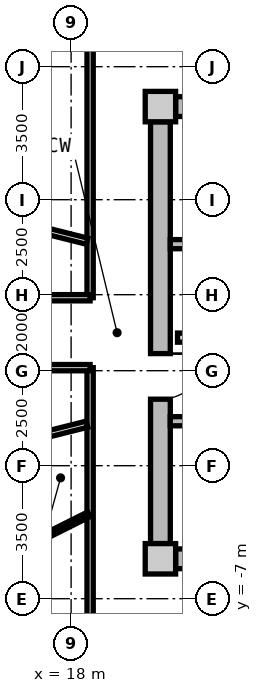
"""IFC4 building model, lengths in metres.
Left out: names, types, materials, properties, quantities, classifications, styles, units other than length and angle.
Written with IfcOpenShell. Run it as: python <this file> out.ifc"""

import sys

from ifc_helpers import new_model, si_unit, direction, frame, frame_2d, origin, origin_2d, place, context, subcontext, project, spatial, rectangle, extrude, source, transform, mapped, element, fill, save


model = new_model("IFC4")
c1 = context("Model", 3, precision=1e-05, world=origin(), true_north=direction((0.0, 1.0)))
c2 = subcontext(c1, "Body", "Model", "MODEL_VIEW")
j1 = project(units=[si_unit("LENGTHUNIT", "METRE"), si_unit("PLANEANGLEUNIT", "RADIAN")], contexts=[c1])
p1 = place(None, origin())
s1 = spatial("IfcSite", under=j1, at=p1, CompositionType="ELEMENT")
p2 = place(p1, origin())
s2 = spatial("IfcBuilding", under=s1, at=p2, CompositionType="ELEMENT")
p3 = place(p2, frame((0.0, 0.0, 229.15)))
s3 = spatial("IfcBuildingStorey", under=s2, at=p3, CompositionType="ELEMENT", Elevation=229.15)
m1 = source(origin(), c2, "Body", "SweptSolid", [
    extrude(rectangle(XDim=0.8, YDim=0.8, at=origin_2d()), origin(), (0.0, 0.0, 1.0), 3.05),
])
for number, where, z_axis, x_axis in (
    (1, (20.35, -5.95, 0.0), (0.0, 0.0, 1.0), (1.0, 0.0, 0.0)),
    (2, (20.35, 5.95, 0.0), (0.0, 0.0, 1.0), (1.0, 0.0, 0.0)),
):
    element("IfcColumn", number, at=place(p3, frame(where, z_axis=z_axis, x_axis=x_axis)), inside=s3, PredefinedType="COLUMN", context=c2, shape_type="MappedRepresentation", body=[
        mapped(m1, transform((0.0, 0.0, 0.0), x_axis=(1.0, 0.0, 0.0), y_axis=(0.0, 1.0, 0.0), z_axis=(0.0, 0.0, 1.0), scale=1.0)),
    ])
m2 = source(origin(), c2, "Body", "SweptSolid", [
    extrude(rectangle(XDim=14.5, YDim=0.52, at=frame_2d((7.25, 0.0))), origin(), (0.0, 0.0, 1.0), 2.81),
])
for number, where, z_axis, x_axis in (
    (3, (20.75, 5.95, 0.0), (0.0, 0.0, 1.0), (1.0, 0.0, 0.0)),
    (4, (35.25, -5.95, 0.0), (0.0, 0.0, 1.0), (-1.0, 0.0, 0.0)),
):
    element("IfcWall", number, at=place(p3, frame(where, z_axis=z_axis, x_axis=x_axis)), inside=s3, PredefinedType="SHEAR", context=c2, shape_type="MappedRepresentation", body=[
        mapped(m2, transform((0.0, 0.0, 0.0), x_axis=(1.0, 0.0, 0.0), y_axis=(0.0, 1.0, 0.0), z_axis=(0.0, 0.0, 1.0), scale=1.0)),
    ])
m3 = source(origin(), c2, "Body", "SweptSolid", [
    extrude(rectangle(XDim=11.1, YDim=0.52, at=frame_2d((5.55, 0.0))), origin(), (0.0, 0.0, 1.0), 2.81),
])
p4 = place(p3, frame((20.35, -5.55, 0.0), z_axis=(0.0, 0.0, 1.0), x_axis=(0.0, 1.0, 0.0)))
e5 = element("IfcWall", 5, at=p4, inside=s3, PredefinedType="SHEAR", context=c2, shape_type="MappedRepresentation", body=[
    mapped(m3, transform((0.0, 0.0, 0.0), x_axis=(1.0, 0.0, 0.0), y_axis=(0.0, 1.0, 0.0), z_axis=(0.0, 0.0, 1.0), scale=1.0)),
])
p5 = place(p4, frame((3.8, 0.0, 0.0)))
e6 = element("IfcOpeningElement", 6, at=p5, cuts=e5, PredefinedType="OPENING", context=c2, shape_type="SweptSolid", body=[
    extrude(rectangle(XDim=1.2, YDim=2.15, at=frame_2d((0.6, 1.075))), frame((0.0, 0.27, 0.0), z_axis=(0.0, -1.0, 0.0), x_axis=(1.0, 0.0, 0.0)), (0.0, 0.0, 1.0), 0.54),
])
m4 = source(origin(), c2, "Body", "SweptSolid", [
    extrude(rectangle(XDim=7.93, YDim=0.24, at=frame_2d((3.965, 0.0))), origin(), (0.0, 0.0, 1.0), 2.81),
])
p6 = place(p3, frame((20.61, 2.33, 0.0), z_axis=(0.0, 0.0, 1.0), x_axis=(1.0, 0.0, 0.0)))
e7 = element("IfcWall", 7, at=p6, inside=s3, PredefinedType="PARTITIONING", context=c2, shape_type="MappedRepresentation", body=[
    mapped(m4, transform((0.0, 0.0, 0.0), x_axis=(1.0, 0.0, 0.0), y_axis=(0.0, 1.0, 0.0), z_axis=(0.0, 0.0, 1.0), scale=1.0)),
])
p7 = place(p3, frame((20.61, -2.33, 0.0), z_axis=(0.0, 0.0, 1.0), x_axis=(1.0, 0.0, 0.0)))
e8 = element("IfcWall", 8, at=p7, inside=s3, PredefinedType="PARTITIONING", context=c2, shape_type="MappedRepresentation", body=[
    mapped(m4, transform((0.0, 0.0, 0.0), x_axis=(1.0, 0.0, 0.0), y_axis=(0.0, 1.0, 0.0), z_axis=(0.0, 0.0, 1.0), scale=1.0)),
])
p8 = place(p7, frame((1.05, 0.0, 0.0)))
e9 = element("IfcOpeningElement", 9, at=p8, cuts=e8, PredefinedType="OPENING", context=c2, shape_type="SweptSolid", body=[
    extrude(rectangle(XDim=1.1, YDim=2.15, at=frame_2d((0.55, 1.075))), frame((0.0, 0.13, 0.0), z_axis=(0.0, -1.0, 0.0), x_axis=(1.0, 0.0, 0.0)), (0.0, 0.0, 1.0), 0.26),
])
m5 = source(origin(), c2, "Body", "SweptSolid", [
    extrude(rectangle(XDim=7.62, YDim=0.24, at=frame_2d((3.81, 0.0))), origin(), (0.0, 0.0, 1.0), 2.795),
])
p9 = place(p3, frame((20.8, -0.13, 0.0), z_axis=(0.0, 0.0, 1.0), x_axis=(1.0, 0.0, 0.0)))
e10 = element("IfcWall", 10, at=p9, inside=s3, PredefinedType="PARTITIONING", context=c2, shape_type="MappedRepresentation", body=[
    mapped(m5, transform((0.0, 0.0, 0.0), x_axis=(1.0, 0.0, 0.0), y_axis=(0.0, 1.0, 0.0), z_axis=(0.0, 0.0, 1.0), scale=1.0)),
])
p10 = place(p9, frame((6.22, 0.0, 0.0)))
e11 = element("IfcOpeningElement", 11, at=p10, cuts=e10, PredefinedType="OPENING", context=c2, shape_type="SweptSolid", body=[
    extrude(rectangle(XDim=1.0, YDim=2.1, at=frame_2d((0.5, 1.05))), frame((0.0, 0.13, 0.0), z_axis=(0.0, -1.0, 0.0), x_axis=(1.0, 0.0, 0.0)), (0.0, 0.0, 1.0), 0.26),
])
p11 = place(p9, frame((2.4, 0.0, 0.0)))
e12 = element("IfcOpeningElement", 12, at=p11, cuts=e10, PredefinedType="OPENING", context=c2, shape_type="SweptSolid", body=[
    extrude(rectangle(XDim=1.0, YDim=2.1, at=frame_2d((0.5, 1.05))), frame((0.0, 0.13, 0.0), z_axis=(0.0, -1.0, 0.0), x_axis=(1.0, 0.0, 0.0)), (0.0, 0.0, 1.0), 0.26),
])
m6 = source(origin(), c2, "Body", "SweptSolid", [
    extrude(rectangle(XDim=6.88, YDim=0.165, at=frame_2d((3.44, 0.0))), origin(), (0.0, 0.0, 1.0), 2.795),
])
for number, where, z_axis, x_axis in (
    (13, (18.5, -7.8, 0.0), (0.0, 0.0, 1.0), (0.0, 1.0, 0.0)),
    (14, (18.5, 0.92, 0.0), (0.0, 0.0, 1.0), (0.0, 1.0, 0.0)),
):
    element("IfcWall", number, at=place(p3, frame(where, z_axis=z_axis, x_axis=x_axis)), inside=s3, PredefinedType="PARTITIONING", context=c2, shape_type="MappedRepresentation", body=[
        mapped(m6, transform((0.0, 0.0, 0.0), x_axis=(1.0, 0.0, 0.0), y_axis=(0.0, 1.0, 0.0), z_axis=(0.0, 0.0, 1.0), scale=1.0)),
    ])
m7 = source(origin(), c2, "Body", "SweptSolid", [
    extrude(rectangle(XDim=6.157, YDim=0.165, at=frame_2d((3.079, 0.0))), origin(), (0.0, 0.0, 1.0), 2.395),
])
for number, where, z_axis, x_axis in (
    (15, (18.42, 2.407, 0.0), (0.0, 0.0, 1.0), (-0.97, 0.244, 0.0)),
    (16, (18.42, -2.407, 0.0), (0.0, 0.0, 1.0), (-0.97, -0.244, 0.0)),
):
    element("IfcWall", number, at=place(p3, frame(where, z_axis=z_axis, x_axis=x_axis)), inside=s3, PredefinedType="PARTITIONING", context=c2, shape_type="MappedRepresentation", body=[
        mapped(m7, transform((0.0, 0.0, 0.0), x_axis=(1.0, 0.0, 0.0), y_axis=(0.0, 1.0, 0.0), z_axis=(0.0, 0.0, 1.0), scale=1.0)),
    ])
m8 = source(origin(), c2, "Body", "SweptSolid", [
    extrude(rectangle(XDim=1.638, YDim=0.14, at=frame_2d((0.819, 0.0))), origin(), (0.0, 0.0, 1.0), 2.795),
])
p12 = place(p3, frame((18.47, -4.778, 0.0), z_axis=(0.0, 0.0, 1.0), x_axis=(-0.893919977945, -0.448226586707, 0.0)))
e17 = element("IfcWall", 17, at=p12, inside=s3, PredefinedType="PARTITIONING", context=c2, shape_type="MappedRepresentation", body=[
    mapped(m8, transform((0.0, 0.0, 0.0), x_axis=(1.0, 0.0, 0.0), y_axis=(0.0, 1.0, 0.0), z_axis=(0.0, 0.0, 1.0), scale=1.0)),
])
m9 = source(origin(), c2, "Body", "SweptSolid", [
    extrude(rectangle(XDim=3.45, YDim=0.115, at=frame_2d((1.725, 0.0))), origin(), (0.0, 0.0, 1.0), 2.795),
])
p13 = place(p3, frame((16.475, -6.275, 0.0), z_axis=(0.0, 0.0, 1.0), x_axis=(0.483659007882, -0.875256513312, 0.0)))
e18 = element("IfcWall", 18, at=p13, inside=s3, PredefinedType="PARTITIONING", context=c2, shape_type="MappedRepresentation", body=[
    mapped(m9, transform((0.0, 0.0, 0.0), x_axis=(1.0, 0.0, 0.0), y_axis=(0.0, 1.0, 0.0), z_axis=(0.0, 0.0, 1.0), scale=1.0)),
])
p14 = place(p13, frame((1.25, 0.0, 0.0)))
e19 = element("IfcOpeningElement", 19, at=p14, cuts=e18, PredefinedType="OPENING", context=c2, shape_type="SweptSolid", body=[
    extrude(rectangle(XDim=0.95, YDim=2.1, at=frame_2d((0.475, 1.05))), frame((0.0, 0.067, 0.0), z_axis=(0.0, -1.0, 0.0), x_axis=(1.0, 0.0, 0.0)), (0.0, 0.0, 1.0), 0.135),
])
m10 = source(origin(), c2, "Body", "SweptSolid", [
    extrude(rectangle(XDim=37.0, YDim=0.165, at=frame_2d((18.5, 0.0))), origin(), (0.0, 0.0, 1.0), 2.795),
])
p15 = place(p3, frame((-18.5, -0.92, 0.0), z_axis=(0.0, 0.0, 1.0), x_axis=(1.0, 0.0, 0.0)))
e20 = element("IfcWall", 20, at=p15, inside=s3, PredefinedType="PARTITIONING", context=c2, shape_type="MappedRepresentation", body=[
    mapped(m10, transform((0.0, 0.0, 0.0), x_axis=(1.0, 0.0, 0.0), y_axis=(0.0, 1.0, 0.0), z_axis=(0.0, 0.0, 1.0), scale=1.0)),
])
p16 = place(p15, frame((2.662, 0.0, 0.0)))
e21 = element("IfcOpeningElement", 21, at=p16, cuts=e20, PredefinedType="OPENING", context=c2, shape_type="SweptSolid", body=[
    extrude(rectangle(XDim=0.95, YDim=2.1, at=frame_2d((0.475, 1.05))), frame((0.0, 0.093, 0.0), z_axis=(0.0, -1.0, 0.0), x_axis=(1.0, 0.0, 0.0)), (0.0, 0.0, 1.0), 0.185),
])
p17 = place(p15, frame((33.388, 0.0, 0.0)))
e22 = element("IfcOpeningElement", 22, at=p17, cuts=e20, PredefinedType="OPENING", context=c2, shape_type="SweptSolid", body=[
    extrude(rectangle(XDim=0.95, YDim=2.1, at=frame_2d((0.475, 1.05))), frame((0.0, 0.093, 0.0), z_axis=(0.0, -1.0, 0.0), x_axis=(1.0, 0.0, 0.0)), (0.0, 0.0, 1.0), 0.185),
])
p18 = place(p15, frame((12.71, 0.0, 0.0)))
e23 = element("IfcOpeningElement", 23, at=p18, cuts=e20, PredefinedType="OPENING", context=c2, shape_type="SweptSolid", body=[
    extrude(rectangle(XDim=1.25, YDim=2.2, at=frame_2d((0.625, 1.1))), frame((0.0, 0.093, 0.0), z_axis=(0.0, -1.0, 0.0), x_axis=(1.0, 0.0, 0.0)), (0.0, 0.0, 1.0), 0.185),
])
p19 = place(p15, frame((20.875, 0.0, 0.0)))
e24 = element("IfcOpeningElement", 24, at=p19, cuts=e20, PredefinedType="OPENING", context=c2, shape_type="SweptSolid", body=[
    extrude(rectangle(XDim=1.25, YDim=2.2, at=frame_2d((0.625, 1.1))), frame((0.0, 0.093, 0.0), z_axis=(0.0, -1.0, 0.0), x_axis=(1.0, 0.0, 0.0)), (0.0, 0.0, 1.0), 0.185),
])
p20 = place(p15, frame((26.675, 0.0, 0.0)))
e25 = element("IfcOpeningElement", 25, at=p20, cuts=e20, PredefinedType="OPENING", context=c2, shape_type="SweptSolid", body=[
    extrude(rectangle(XDim=1.25, YDim=2.2, at=frame_2d((0.625, 1.1))), frame((0.0, 0.093, 0.0), z_axis=(0.0, -1.0, 0.0), x_axis=(1.0, 0.0, 0.0)), (0.0, 0.0, 1.0), 0.185),
])
p21 = place(p3, frame((-18.5, 0.92, 0.0), z_axis=(0.0, 0.0, 1.0), x_axis=(1.0, 0.0, 0.0)))
e26 = element("IfcWall", 26, at=p21, inside=s3, PredefinedType="PARTITIONING", context=c2, shape_type="MappedRepresentation", body=[
    mapped(m10, transform((0.0, 0.0, 0.0), x_axis=(1.0, 0.0, 0.0), y_axis=(0.0, 1.0, 0.0), z_axis=(0.0, 0.0, 1.0), scale=1.0)),
])
p22 = place(p21, frame((2.662, 0.0, 0.0)))
e27 = element("IfcOpeningElement", 27, at=p22, cuts=e26, PredefinedType="OPENING", context=c2, shape_type="SweptSolid", body=[
    extrude(rectangle(XDim=0.95, YDim=2.1, at=frame_2d((0.475, 1.05))), frame((0.0, 0.093, 0.0), z_axis=(0.0, -1.0, 0.0), x_axis=(1.0, 0.0, 0.0)), (0.0, 0.0, 1.0), 0.185),
])
p23 = place(p21, frame((33.388, 0.0, 0.0)))
e28 = element("IfcOpeningElement", 28, at=p23, cuts=e26, PredefinedType="OPENING", context=c2, shape_type="SweptSolid", body=[
    extrude(rectangle(XDim=0.95, YDim=2.1, at=frame_2d((0.475, 1.05))), frame((0.0, 0.093, 0.0), z_axis=(0.0, -1.0, 0.0), x_axis=(1.0, 0.0, 0.0)), (0.0, 0.0, 1.0), 0.185),
])
p24 = place(p21, frame((7.64, 0.0, 0.0)))
e29 = element("IfcOpeningElement", 29, at=p24, cuts=e26, PredefinedType="OPENING", context=c2, shape_type="SweptSolid", body=[
    extrude(rectangle(XDim=0.92, YDim=2.1, at=frame_2d((0.46, 1.05))), frame((0.0, 0.093, 0.0), z_axis=(0.0, -1.0, 0.0), x_axis=(1.0, 0.0, 0.0)), (0.0, 0.0, 1.0), 0.185),
])
p25 = place(p21, frame((13.275, 0.0, 0.0)))
e30 = element("IfcOpeningElement", 30, at=p25, cuts=e26, PredefinedType="OPENING", context=c2, shape_type="SweptSolid", body=[
    extrude(rectangle(XDim=1.25, YDim=2.2, at=frame_2d((0.625, 1.1))), frame((0.0, 0.093, 0.0), z_axis=(0.0, -1.0, 0.0), x_axis=(1.0, 0.0, 0.0)), (0.0, 0.0, 1.0), 0.185),
])
p26 = place(p21, frame((20.875, 0.0, 0.0)))
e31 = element("IfcOpeningElement", 31, at=p26, cuts=e26, PredefinedType="OPENING", context=c2, shape_type="SweptSolid", body=[
    extrude(rectangle(XDim=1.25, YDim=2.2, at=frame_2d((0.625, 1.1))), frame((0.0, 0.093, 0.0), z_axis=(0.0, -1.0, 0.0), x_axis=(1.0, 0.0, 0.0)), (0.0, 0.0, 1.0), 0.185),
])
p27 = place(p21, frame((26.675, 0.0, 0.0)))
e32 = element("IfcOpeningElement", 32, at=p27, cuts=e26, PredefinedType="OPENING", context=c2, shape_type="SweptSolid", body=[
    extrude(rectangle(XDim=1.25, YDim=2.2, at=frame_2d((0.625, 1.1))), frame((0.0, 0.093, 0.0), z_axis=(0.0, -1.0, 0.0), x_axis=(1.0, 0.0, 0.0)), (0.0, 0.0, 1.0), 0.185),
])
m11 = source(origin(), c2, "Body", "SweptSolid", [
    extrude(rectangle(XDim=1.2, YDim=2.15, at=frame_2d((0.6, 1.075))), frame((0.0, 0.025, 0.0), z_axis=(0.0, -1.0, 0.0), x_axis=(1.0, 0.0, 0.0)), (0.0, 0.0, 1.0), 0.05),
])
p28 = place(p5, frame((1.2, 0.0, 0.0), z_axis=(0.0, 0.0, 1.0), x_axis=(-1.0, 0.0, 0.0)))
e33 = element("IfcDoor", 33, at=p28, inside=s3, OperationType="SINGLE_SWING_LEFT", PredefinedType="DOOR", context=c2, shape_type="MappedRepresentation", body=[
    mapped(m11, transform((0.0, 0.0, 0.0), x_axis=(1.0, 0.0, 0.0), y_axis=(0.0, 1.0, 0.0), z_axis=(0.0, 0.0, 1.0), scale=1.0)),
])
fill(e6, e33)
m12 = source(origin(), c2, "Body", "SweptSolid", [
    extrude(rectangle(XDim=0.95, YDim=2.1, at=frame_2d((0.475, 1.05))), frame((0.0, 0.025, 0.0), z_axis=(0.0, -1.0, 0.0), x_axis=(1.0, 0.0, 0.0)), (0.0, 0.0, 1.0), 0.05),
])
p29 = place(p14, frame((0.95, 0.0, 0.0), z_axis=(0.0, 0.0, 1.0), x_axis=(-1.0, 0.0, 0.0)))
e34 = element("IfcDoor", 34, at=p29, inside=s3, OperationType="SINGLE_SWING_LEFT", PredefinedType="DOOR", context=c2, shape_type="MappedRepresentation", body=[
    mapped(m12, transform((0.0, 0.0, 0.0), x_axis=(1.0, 0.0, 0.0), y_axis=(0.0, 1.0, 0.0), z_axis=(0.0, 0.0, 1.0), scale=1.0)),
])
fill(e19, e34)
save(model, sys.argv[1])
